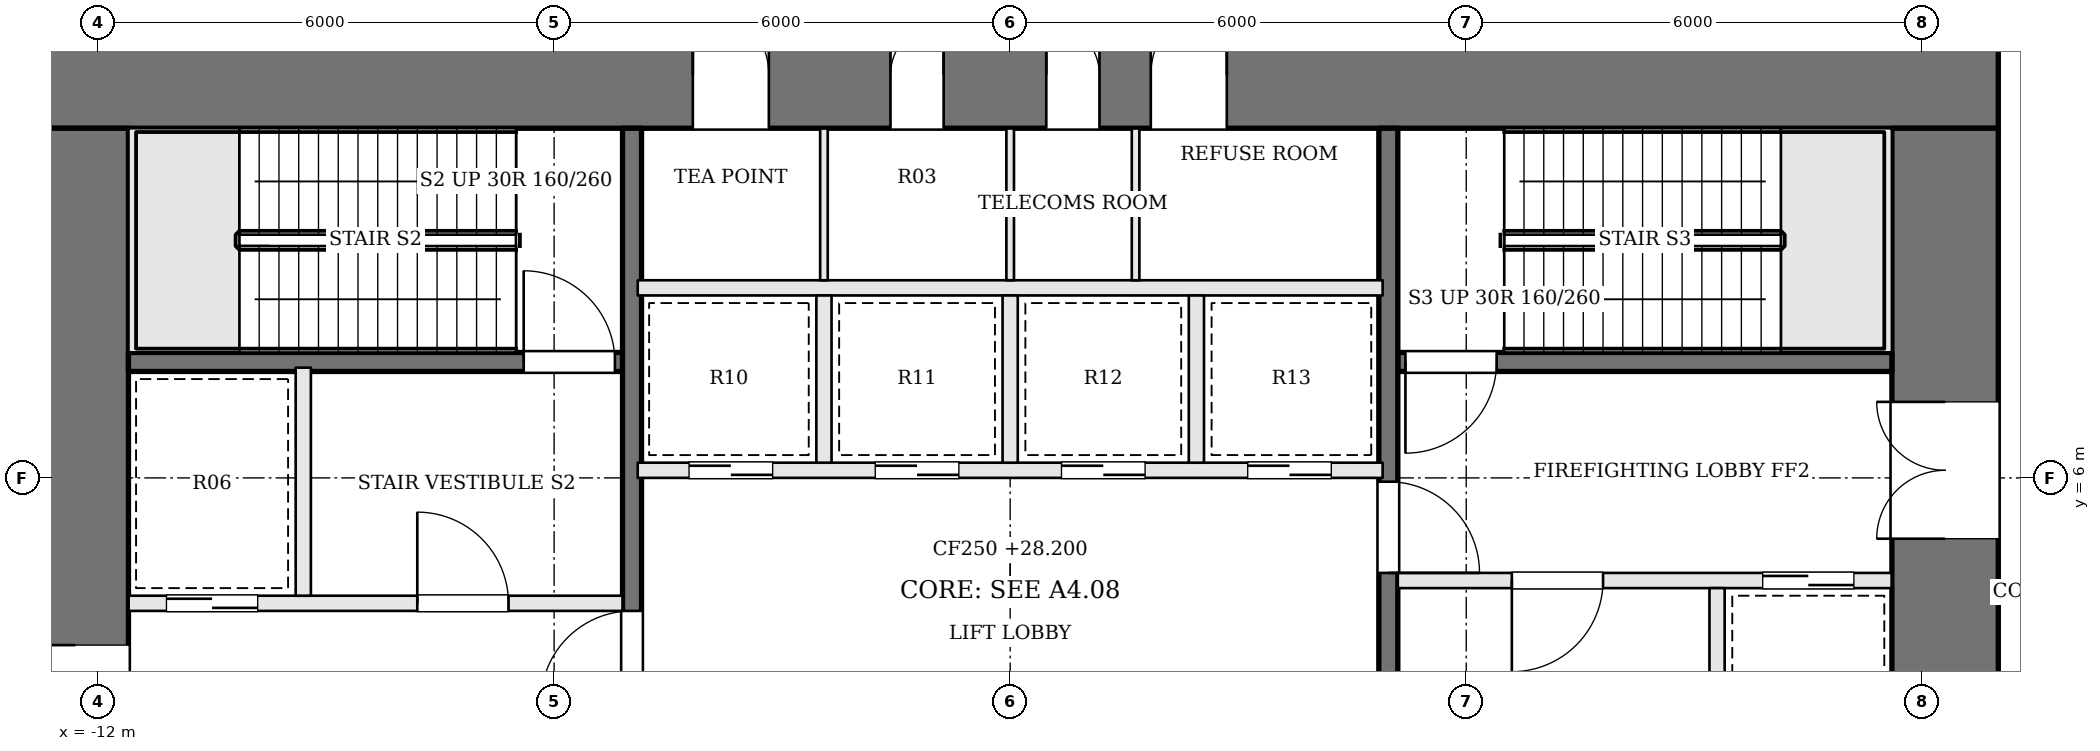
"""IFC4 building model, lengths in metres.
Left out: names, types, materials, properties, quantities, classifications, styles, units other than length and angle.
Written with IfcOpenShell. Run it as: python <this file> out.ifc"""

import sys

from ifc_helpers import new_model, si_unit, direction, frame, frame_2d, origin, place, context, subcontext, project, spatial, rectangle, extrude, element, fill, save


model = new_model("IFC4")
c1 = context("Model", 3, precision=1e-05, world=origin(), true_north=direction((0.0, 1.0)))
c2 = subcontext(c1, "Body", "Model", "MODEL_VIEW")
j1 = project(units=[si_unit("LENGTHUNIT", "METRE"), si_unit("PLANEANGLEUNIT", "RADIAN")], contexts=[c1])
p1 = place(None, origin())
s1 = spatial("IfcSite", under=j1, at=p1, CompositionType="ELEMENT")
p2 = place(p1, origin())
s2 = spatial("IfcBuilding", under=s1, at=p2, CompositionType="ELEMENT")
p3 = place(p2, frame((0.0, 0.0, 28.2)))
s3 = spatial("IfcBuildingStorey", under=s2, at=p3, CompositionType="ELEMENT", Elevation=28.2)
p4 = place(p3, frame((-13.0, 11.3, 0.0), z_axis=(0.0, 0.0, 1.0), x_axis=(1.0, 0.0, 0.0)))
e1 = element("IfcWall", 1, at=p4, inside=s3, PredefinedType="SHEAR", context=c2, shape_type="SweptSolid", body=[
    extrude(rectangle(XDim=26.0, YDim=1.4, at=frame_2d((13.0, 0.0))), origin(), (0.0, 0.0, 1.0), 4.8),
])
p5 = place(p4, frame((8.825, 0.0, 0.0)))
e2 = element("IfcOpeningElement", 2, at=p5, cuts=e1, PredefinedType="OPENING", context=c2, shape_type="SweptSolid", body=[
    extrude(rectangle(XDim=1.0, YDim=2.1, at=frame_2d((0.5, 1.05))), frame((0.0, 0.71, 0.0), z_axis=(0.0, -1.0, 0.0), x_axis=(1.0, 0.0, 0.0)), (0.0, 0.0, 1.0), 1.42),
])
p6 = place(p4, frame((11.425, 0.0, 0.0)))
e3 = element("IfcOpeningElement", 3, at=p6, cuts=e1, PredefinedType="OPENING", context=c2, shape_type="SweptSolid", body=[
    extrude(rectangle(XDim=0.7, YDim=2.1, at=frame_2d((0.35, 1.05))), frame((0.0, 0.71, 0.0), z_axis=(0.0, -1.0, 0.0), x_axis=(1.0, 0.0, 0.0)), (0.0, 0.0, 1.0), 1.42),
])
p7 = place(p4, frame((13.475, 0.0, 0.0)))
e4 = element("IfcOpeningElement", 4, at=p7, cuts=e1, PredefinedType="OPENING", context=c2, shape_type="SweptSolid", body=[
    extrude(rectangle(XDim=0.7, YDim=2.1, at=frame_2d((0.35, 1.05))), frame((0.0, 0.71, 0.0), z_axis=(0.0, -1.0, 0.0), x_axis=(1.0, 0.0, 0.0)), (0.0, 0.0, 1.0), 1.42),
])
p8 = place(p4, frame((14.85, 0.0, 0.0)))
e5 = element("IfcOpeningElement", 5, at=p8, cuts=e1, PredefinedType="OPENING", context=c2, shape_type="SweptSolid", body=[
    extrude(rectangle(XDim=1.0, YDim=2.1, at=frame_2d((0.5, 1.05))), frame((0.0, 0.71, 0.0), z_axis=(0.0, -1.0, 0.0), x_axis=(1.0, 0.0, 0.0)), (0.0, 0.0, 1.0), 1.42),
])
p9 = place(p3, frame((12.3, -1.6, 0.0), z_axis=(0.0, 0.0, 1.0), x_axis=(0.0, 1.0, 0.0)))
e6 = element("IfcWall", 6, at=p9, inside=s3, PredefinedType="SHEAR", context=c2, shape_type="SweptSolid", body=[
    extrude(rectangle(XDim=12.2, YDim=1.4, at=frame_2d((6.1, 0.0))), origin(), (0.0, 0.0, 1.0), 4.8),
])
p10 = place(p9, frame((6.8, 0.0, 0.0)))
e7 = element("IfcOpeningElement", 7, at=p10, cuts=e6, PredefinedType="OPENING", context=c2, shape_type="SweptSolid", body=[
    extrude(rectangle(XDim=1.8, YDim=2.1, at=frame_2d((0.9, 1.05))), frame((0.0, 0.71, 0.0), z_axis=(0.0, -1.0, 0.0), x_axis=(1.0, 0.0, 0.0)), (0.0, 0.0, 1.0), 1.42),
])
p11 = place(p3, frame((-12.3, -1.6, 0.0), z_axis=(0.0, 0.0, 1.0), x_axis=(0.0, 1.0, 0.0)))
e8 = element("IfcWall", 8, at=p11, inside=s3, PredefinedType="SHEAR", context=c2, shape_type="SweptSolid", body=[
    extrude(rectangle(XDim=12.2, YDim=1.4, at=frame_2d((6.1, 0.0))), origin(), (0.0, 0.0, 1.0), 4.8),
])
p12 = place(p11, frame((3.6, 0.0, 0.0)))
e9 = element("IfcOpeningElement", 9, at=p12, cuts=e8, PredefinedType="OPENING", context=c2, shape_type="SweptSolid", body=[
    extrude(rectangle(XDim=1.8, YDim=2.1, at=frame_2d((0.9, 1.05))), frame((0.0, 0.71, 0.0), z_axis=(0.0, -1.0, 0.0), x_axis=(1.0, 0.0, 0.0)), (0.0, 0.0, 1.0), 1.42),
])
p13 = place(p3, frame((11.6, 7.525, 0.0), z_axis=(0.0, 0.0, 1.0), x_axis=(-1.0, 0.0, 0.0)))
e10 = element("IfcWall", 10, at=p13, inside=s3, PredefinedType="SOLIDWALL", context=c2, shape_type="SweptSolid", body=[
    extrude(rectangle(XDim=6.5, YDim=0.25, at=frame_2d((3.25, 0.0))), origin(), (0.0, 0.0, 1.0), 4.5),
])
p14 = place(p13, frame((5.2, 0.0, 0.0)))
e11 = element("IfcOpeningElement", 11, at=p14, cuts=e10, PredefinedType="OPENING", context=c2, shape_type="SweptSolid", body=[
    extrude(rectangle(XDim=1.2, YDim=2.1, at=frame_2d((0.6, 1.05))), frame((0.0, 0.135, 0.0), z_axis=(0.0, -1.0, 0.0), x_axis=(1.0, 0.0, 0.0)), (0.0, 0.0, 1.0), 0.27),
])
p15 = place(p3, frame((-11.6, 4.35, 0.0), z_axis=(0.0, 0.0, 1.0), x_axis=(1.0, 0.0, 0.0)))
e12 = element("IfcWall", 12, at=p15, inside=s3, PredefinedType="SOLIDWALL", context=c2, shape_type="SweptSolid", body=[
    extrude(rectangle(XDim=6.5, YDim=0.2, at=frame_2d((3.25, 0.0))), origin(), (0.0, 0.0, 1.0), 4.5),
])
p16 = place(p15, frame((3.8, 0.0, 0.0)))
e13 = element("IfcOpeningElement", 13, at=p16, cuts=e12, PredefinedType="OPENING", context=c2, shape_type="SweptSolid", body=[
    extrude(rectangle(XDim=1.2, YDim=2.1, at=frame_2d((0.6, 1.05))), frame((0.0, 0.11, 0.0), z_axis=(0.0, -1.0, 0.0), x_axis=(1.0, 0.0, 0.0)), (0.0, 0.0, 1.0), 0.22),
])
p17 = place(p15, frame((0.5, 0.0, 0.0)))
e14 = element("IfcOpeningElement", 14, at=p17, cuts=e12, PredefinedType="OPENING", context=c2, shape_type="SweptSolid", body=[
    extrude(rectangle(XDim=1.2, YDim=2.1, at=frame_2d((0.6, 1.05))), frame((0.0, 0.11, 0.0), z_axis=(0.0, -1.0, 0.0), x_axis=(1.0, 0.0, 0.0)), (0.0, 0.0, 1.0), 0.22),
])
p18 = place(p3, frame((11.6, 4.65, 0.0), z_axis=(0.0, 0.0, 1.0), x_axis=(-1.0, 0.0, 0.0)))
e15 = element("IfcWall", 15, at=p18, inside=s3, PredefinedType="SOLIDWALL", context=c2, shape_type="SweptSolid", body=[
    extrude(rectangle(XDim=6.5, YDim=0.2, at=frame_2d((3.25, 0.0))), origin(), (0.0, 0.0, 1.0), 4.5),
])
p19 = place(p18, frame((3.8, 0.0, 0.0)))
e16 = element("IfcOpeningElement", 16, at=p19, cuts=e15, PredefinedType="OPENING", context=c2, shape_type="SweptSolid", body=[
    extrude(rectangle(XDim=1.2, YDim=2.1, at=frame_2d((0.6, 1.05))), frame((0.0, 0.11, 0.0), z_axis=(0.0, -1.0, 0.0), x_axis=(1.0, 0.0, 0.0)), (0.0, 0.0, 1.0), 0.22),
])
p20 = place(p18, frame((0.5, 0.0, 0.0)))
e17 = element("IfcOpeningElement", 17, at=p20, cuts=e15, PredefinedType="OPENING", context=c2, shape_type="SweptSolid", body=[
    extrude(rectangle(XDim=1.2, YDim=2.1, at=frame_2d((0.6, 1.05))), frame((0.0, 0.11, 0.0), z_axis=(0.0, -1.0, 0.0), x_axis=(1.0, 0.0, 0.0)), (0.0, 0.0, 1.0), 0.22),
])
p21 = place(p3, frame((-11.6, 7.525, 0.0), z_axis=(0.0, 0.0, 1.0), x_axis=(1.0, 0.0, 0.0)))
e18 = element("IfcWall", 18, at=p21, inside=s3, PredefinedType="SOLIDWALL", context=c2, shape_type="SweptSolid", body=[
    extrude(rectangle(XDim=6.5, YDim=0.25, at=frame_2d((3.25, 0.0))), origin(), (0.0, 0.0, 1.0), 4.5),
])
p22 = place(p21, frame((5.2, 0.0, 0.0)))
e19 = element("IfcOpeningElement", 19, at=p22, cuts=e18, PredefinedType="OPENING", context=c2, shape_type="SweptSolid", body=[
    extrude(rectangle(XDim=1.2, YDim=2.1, at=frame_2d((0.6, 1.05))), frame((0.0, 0.135, 0.0), z_axis=(0.0, -1.0, 0.0), x_axis=(1.0, 0.0, 0.0)), (0.0, 0.0, 1.0), 0.27),
])
for number, where, z_axis, x_axis in (
    (20, (-9.3, 4.45, 0.0), (0.0, 0.0, 1.0), (0.0, 1.0, 0.0)),
    (21, (9.3, 4.55, 0.0), (0.0, 0.0, 1.0), (0.0, -1.0, 0.0)),
):
    element("IfcWall", number, at=place(p3, frame(where, z_axis=z_axis, x_axis=x_axis)), inside=s3, PredefinedType="SOLIDWALL", context=c2, shape_type="SweptSolid", body=[
        extrude(rectangle(XDim=3.0, YDim=0.2, at=frame_2d((1.5, 0.0))), origin(), (0.0, 0.0, 1.0), 4.5),
    ])
p23 = place(p3, frame((-4.975, -1.6, 0.0), z_axis=(0.0, 0.0, 1.0), x_axis=(0.0, 1.0, 0.0)))
e22 = element("IfcWall", 22, at=p23, inside=s3, PredefinedType="SOLIDWALL", context=c2, shape_type="SweptSolid", body=[
    extrude(rectangle(XDim=12.2, YDim=0.25, at=frame_2d((6.1, 0.0))), origin(), (0.0, 0.0, 1.0), 4.5),
])
p24 = place(p23, frame((4.65, 0.0, 0.0)))
e23 = element("IfcOpeningElement", 23, at=p24, cuts=e22, PredefinedType="OPENING", context=c2, shape_type="SweptSolid", body=[
    extrude(rectangle(XDim=1.2, YDim=2.1, at=frame_2d((0.6, 1.05))), frame((0.0, 0.135, 0.0), z_axis=(0.0, -1.0, 0.0), x_axis=(1.0, 0.0, 0.0)), (0.0, 0.0, 1.0), 0.27),
])
p25 = place(p3, frame((4.975, 10.6, 0.0), z_axis=(0.0, 0.0, 1.0), x_axis=(0.0, -1.0, 0.0)))
e24 = element("IfcWall", 24, at=p25, inside=s3, PredefinedType="SOLIDWALL", context=c2, shape_type="SweptSolid", body=[
    extrude(rectangle(XDim=12.2, YDim=0.25, at=frame_2d((6.1, 0.0))), origin(), (0.0, 0.0, 1.0), 4.5),
])
p26 = place(p25, frame((4.65, 0.0, 0.0)))
e25 = element("IfcOpeningElement", 25, at=p26, cuts=e24, PredefinedType="OPENING", context=c2, shape_type="SweptSolid", body=[
    extrude(rectangle(XDim=1.2, YDim=2.1, at=frame_2d((0.6, 1.05))), frame((0.0, 0.135, 0.0), z_axis=(0.0, -1.0, 0.0), x_axis=(1.0, 0.0, 0.0)), (0.0, 0.0, 1.0), 0.27),
])
p27 = place(p3, frame((-4.9, 6.1, 0.0), z_axis=(0.0, 0.0, 1.0), x_axis=(1.0, 0.0, 0.0)))
e26 = element("IfcWall", 26, at=p27, inside=s3, PredefinedType="SOLIDWALL", context=c2, shape_type="SweptSolid", body=[
    extrude(rectangle(XDim=9.8, YDim=0.2, at=frame_2d((4.9, 0.0))), origin(), (0.0, 0.0, 1.0), 4.5),
])
p28 = place(p27, frame((0.675, 0.0, 0.0)))
e27 = element("IfcOpeningElement", 27, at=p28, cuts=e26, PredefinedType="OPENING", context=c2, shape_type="SweptSolid", body=[
    extrude(rectangle(XDim=1.1, YDim=2.1, at=frame_2d((0.55, 1.05))), frame((0.0, 0.11, 0.0), z_axis=(0.0, -1.0, 0.0), x_axis=(1.0, 0.0, 0.0)), (0.0, 0.0, 1.0), 0.22),
])
p29 = place(p27, frame((3.125, 0.0, 0.0)))
e28 = element("IfcOpeningElement", 28, at=p29, cuts=e26, PredefinedType="OPENING", context=c2, shape_type="SweptSolid", body=[
    extrude(rectangle(XDim=1.1, YDim=2.1, at=frame_2d((0.55, 1.05))), frame((0.0, 0.11, 0.0), z_axis=(0.0, -1.0, 0.0), x_axis=(1.0, 0.0, 0.0)), (0.0, 0.0, 1.0), 0.22),
])
p30 = place(p27, frame((5.575, 0.0, 0.0)))
e29 = element("IfcOpeningElement", 29, at=p30, cuts=e26, PredefinedType="OPENING", context=c2, shape_type="SweptSolid", body=[
    extrude(rectangle(XDim=1.1, YDim=2.1, at=frame_2d((0.55, 1.05))), frame((0.0, 0.11, 0.0), z_axis=(0.0, -1.0, 0.0), x_axis=(1.0, 0.0, 0.0)), (0.0, 0.0, 1.0), 0.22),
])
p31 = place(p27, frame((8.025, 0.0, 0.0)))
e30 = element("IfcOpeningElement", 30, at=p31, cuts=e26, PredefinedType="OPENING", context=c2, shape_type="SweptSolid", body=[
    extrude(rectangle(XDim=1.1, YDim=2.1, at=frame_2d((0.55, 1.05))), frame((0.0, 0.11, 0.0), z_axis=(0.0, -1.0, 0.0), x_axis=(1.0, 0.0, 0.0)), (0.0, 0.0, 1.0), 0.22),
])
p32 = place(p3, frame((-4.9, 8.5, 0.0), z_axis=(0.0, 0.0, 1.0), x_axis=(1.0, 0.0, 0.0)))
e31 = element("IfcWall", 31, at=p32, inside=s3, PredefinedType="SOLIDWALL", context=c2, shape_type="SweptSolid", body=[
    extrude(rectangle(XDim=9.8, YDim=0.2, at=frame_2d((4.9, 0.0))), origin(), (0.0, 0.0, 1.0), 4.5),
])
for number, where, z_axis, x_axis in (
    (32, (-2.45, 6.2, 0.0), (0.0, 0.0, 1.0), (0.0, 1.0, 0.0)),
    (33, (0.0, 6.2, 0.0), (0.0, 0.0, 1.0), (0.0, 1.0, 0.0)),
    (34, (2.45, 6.2, 0.0), (0.0, 0.0, 1.0), (0.0, 1.0, 0.0)),
):
    element("IfcWall", number, at=place(p3, frame(where, z_axis=z_axis, x_axis=x_axis)), inside=s3, PredefinedType="SOLIDWALL", context=c2, shape_type="SweptSolid", body=[
        extrude(rectangle(XDim=2.2, YDim=0.2, at=frame_2d((1.1, 0.0))), origin(), (0.0, 0.0, 1.0), 4.5),
    ])
for number, where, z_axis, x_axis in (
    (35, (-2.45, 8.6, 0.0), (0.0, 0.0, 1.0), (0.0, 1.0, 0.0)),
    (36, (0.0, 8.6, 0.0), (0.0, 0.0, 1.0), (0.0, 1.0, 0.0)),
    (37, (1.65, 8.6, 0.0), (0.0, 0.0, 1.0), (0.0, 1.0, 0.0)),
):
    element("IfcWall", number, at=place(p3, frame(where, z_axis=z_axis, x_axis=x_axis)), inside=s3, PredefinedType="PARTITIONING", context=c2, shape_type="SweptSolid", body=[
        extrude(rectangle(XDim=2.0, YDim=0.1, at=frame_2d((1.0, 0.0))), origin(), (0.0, 0.0, 1.0), 4.5),
    ])
p33 = place(p12, origin())
e38 = element("IfcDoor", 38, at=p33, inside=s3, OperationType="DOUBLE_DOOR_SINGLE_SWING", PredefinedType="DOOR", context=c2, shape_type="SweptSolid", body=[
    extrude(rectangle(XDim=1.8, YDim=2.1, at=frame_2d((0.9, 1.05))), frame((0.0, 0.025, 0.0), z_axis=(0.0, -1.0, 0.0), x_axis=(1.0, 0.0, 0.0)), (0.0, 0.0, 1.0), 0.05),
])
fill(e9, e38)
p34 = place(p10, origin())
e39 = element("IfcDoor", 39, at=p34, inside=s3, OperationType="DOUBLE_DOOR_SINGLE_SWING", PredefinedType="DOOR", context=c2, shape_type="SweptSolid", body=[
    extrude(rectangle(XDim=1.8, YDim=2.1, at=frame_2d((0.9, 1.05))), frame((0.0, 0.025, 0.0), z_axis=(0.0, -1.0, 0.0), x_axis=(1.0, 0.0, 0.0)), (0.0, 0.0, 1.0), 0.05),
])
fill(e7, e39)
p35 = place(p24, origin())
e40 = element("IfcDoor", 40, at=p35, inside=s3, OperationType="SINGLE_SWING_LEFT", PredefinedType="DOOR", context=c2, shape_type="SweptSolid", body=[
    extrude(rectangle(XDim=1.2, YDim=2.1, at=frame_2d((0.6, 1.05))), frame((0.0, 0.025, 0.0), z_axis=(0.0, -1.0, 0.0), x_axis=(1.0, 0.0, 0.0)), (0.0, 0.0, 1.0), 0.05),
])
fill(e23, e40)
p36 = place(p26, origin())
e41 = element("IfcDoor", 41, at=p36, inside=s3, OperationType="SINGLE_SWING_RIGHT", PredefinedType="DOOR", context=c2, shape_type="SweptSolid", body=[
    extrude(rectangle(XDim=1.2, YDim=2.1, at=frame_2d((0.6, 1.05))), frame((0.0, 0.025, 0.0), z_axis=(0.0, -1.0, 0.0), x_axis=(1.0, 0.0, 0.0)), (0.0, 0.0, 1.0), 0.05),
])
fill(e25, e41)
p37 = place(p16, origin())
e42 = element("IfcDoor", 42, at=p37, inside=s3, OperationType="SINGLE_SWING_LEFT", PredefinedType="DOOR", context=c2, shape_type="SweptSolid", body=[
    extrude(rectangle(XDim=1.2, YDim=2.1, at=frame_2d((0.6, 1.05))), frame((0.0, 0.025, 0.0), z_axis=(0.0, -1.0, 0.0), x_axis=(1.0, 0.0, 0.0)), (0.0, 0.0, 1.0), 0.05),
])
fill(e13, e42)
p38 = place(p19, origin())
e43 = element("IfcDoor", 43, at=p38, inside=s3, OperationType="SINGLE_SWING_RIGHT", PredefinedType="DOOR", context=c2, shape_type="SweptSolid", body=[
    extrude(rectangle(XDim=1.2, YDim=2.1, at=frame_2d((0.6, 1.05))), frame((0.0, 0.025, 0.0), z_axis=(0.0, -1.0, 0.0), x_axis=(1.0, 0.0, 0.0)), (0.0, 0.0, 1.0), 0.05),
])
fill(e16, e43)
p39 = place(p14, origin())
e44 = element("IfcDoor", 44, at=p39, inside=s3, OperationType="SINGLE_SWING_RIGHT", PredefinedType="DOOR", context=c2, shape_type="SweptSolid", body=[
    extrude(rectangle(XDim=1.2, YDim=2.1, at=frame_2d((0.6, 1.05))), frame((0.0, 0.025, 0.0), z_axis=(0.0, -1.0, 0.0), x_axis=(1.0, 0.0, 0.0)), (0.0, 0.0, 1.0), 0.05),
])
fill(e11, e44)
p40 = place(p22, origin())
e45 = element("IfcDoor", 45, at=p40, inside=s3, OperationType="SINGLE_SWING_LEFT", PredefinedType="DOOR", context=c2, shape_type="SweptSolid", body=[
    extrude(rectangle(XDim=1.2, YDim=2.1, at=frame_2d((0.6, 1.05))), frame((0.0, 0.025, 0.0), z_axis=(0.0, -1.0, 0.0), x_axis=(1.0, 0.0, 0.0)), (0.0, 0.0, 1.0), 0.05),
])
fill(e19, e45)
p41 = place(p17, origin())
e46 = element("IfcDoor", 46, at=p41, inside=s3, OperationType="SLIDING_TO_RIGHT", PredefinedType="DOOR", context=c2, shape_type="SweptSolid", body=[
    extrude(rectangle(XDim=1.2, YDim=2.1, at=frame_2d((0.6, 1.05))), frame((0.0, 0.025, 0.0), z_axis=(0.0, -1.0, 0.0), x_axis=(1.0, 0.0, 0.0)), (0.0, 0.0, 1.0), 0.05),
])
fill(e14, e46)
p42 = place(p20, origin())
e47 = element("IfcDoor", 47, at=p42, inside=s3, OperationType="SLIDING_TO_RIGHT", PredefinedType="DOOR", context=c2, shape_type="SweptSolid", body=[
    extrude(rectangle(XDim=1.2, YDim=2.1, at=frame_2d((0.6, 1.05))), frame((0.0, 0.025, 0.0), z_axis=(0.0, -1.0, 0.0), x_axis=(1.0, 0.0, 0.0)), (0.0, 0.0, 1.0), 0.05),
])
fill(e17, e47)
p43 = place(p28, origin())
e48 = element("IfcDoor", 48, at=p43, inside=s3, OperationType="SLIDING_TO_RIGHT", PredefinedType="DOOR", context=c2, shape_type="SweptSolid", body=[
    extrude(rectangle(XDim=1.1, YDim=2.1, at=frame_2d((0.55, 1.05))), frame((0.0, 0.025, 0.0), z_axis=(0.0, -1.0, 0.0), x_axis=(1.0, 0.0, 0.0)), (0.0, 0.0, 1.0), 0.05),
])
fill(e27, e48)
p44 = place(p29, origin())
e49 = element("IfcDoor", 49, at=p44, inside=s3, OperationType="SLIDING_TO_LEFT", PredefinedType="DOOR", context=c2, shape_type="SweptSolid", body=[
    extrude(rectangle(XDim=1.1, YDim=2.1, at=frame_2d((0.55, 1.05))), frame((0.0, 0.025, 0.0), z_axis=(0.0, -1.0, 0.0), x_axis=(1.0, 0.0, 0.0)), (0.0, 0.0, 1.0), 0.05),
])
fill(e28, e49)
p45 = place(p30, origin())
e50 = element("IfcDoor", 50, at=p45, inside=s3, OperationType="SLIDING_TO_RIGHT", PredefinedType="DOOR", context=c2, shape_type="SweptSolid", body=[
    extrude(rectangle(XDim=1.1, YDim=2.1, at=frame_2d((0.55, 1.05))), frame((0.0, 0.025, 0.0), z_axis=(0.0, -1.0, 0.0), x_axis=(1.0, 0.0, 0.0)), (0.0, 0.0, 1.0), 0.05),
])
fill(e29, e50)
p46 = place(p31, origin())
e51 = element("IfcDoor", 51, at=p46, inside=s3, OperationType="SLIDING_TO_LEFT", PredefinedType="DOOR", context=c2, shape_type="SweptSolid", body=[
    extrude(rectangle(XDim=1.1, YDim=2.1, at=frame_2d((0.55, 1.05))), frame((0.0, 0.025, 0.0), z_axis=(0.0, -1.0, 0.0), x_axis=(1.0, 0.0, 0.0)), (0.0, 0.0, 1.0), 0.05),
])
fill(e30, e51)
p47 = place(p5, origin())
e52 = element("IfcDoor", 52, at=p47, inside=s3, OperationType="SINGLE_SWING_LEFT", PredefinedType="DOOR", context=c2, shape_type="SweptSolid", body=[
    extrude(rectangle(XDim=1.0, YDim=2.1, at=frame_2d((0.5, 1.05))), frame((0.0, 0.025, 0.0), z_axis=(0.0, -1.0, 0.0), x_axis=(1.0, 0.0, 0.0)), (0.0, 0.0, 1.0), 0.05),
])
fill(e2, e52)
p48 = place(p6, origin())
e53 = element("IfcDoor", 53, at=p48, inside=s3, OperationType="SINGLE_SWING_RIGHT", PredefinedType="DOOR", context=c2, shape_type="SweptSolid", body=[
    extrude(rectangle(XDim=0.7, YDim=2.1, at=frame_2d((0.35, 1.05))), frame((0.0, 0.025, 0.0), z_axis=(0.0, -1.0, 0.0), x_axis=(1.0, 0.0, 0.0)), (0.0, 0.0, 1.0), 0.05),
])
fill(e3, e53)
p49 = place(p7, origin())
e54 = element("IfcDoor", 54, at=p49, inside=s3, OperationType="SINGLE_SWING_LEFT", PredefinedType="DOOR", context=c2, shape_type="SweptSolid", body=[
    extrude(rectangle(XDim=0.7, YDim=2.1, at=frame_2d((0.35, 1.05))), frame((0.0, 0.025, 0.0), z_axis=(0.0, -1.0, 0.0), x_axis=(1.0, 0.0, 0.0)), (0.0, 0.0, 1.0), 0.05),
])
fill(e4, e54)
p50 = place(p8, origin())
e55 = element("IfcDoor", 55, at=p50, inside=s3, OperationType="SINGLE_SWING_RIGHT", PredefinedType="DOOR", context=c2, shape_type="SweptSolid", body=[
    extrude(rectangle(XDim=1.0, YDim=2.1, at=frame_2d((0.5, 1.05))), frame((0.0, 0.025, 0.0), z_axis=(0.0, -1.0, 0.0), x_axis=(1.0, 0.0, 0.0)), (0.0, 0.0, 1.0), 0.05),
])
fill(e5, e55)
save(model, sys.argv[1])
